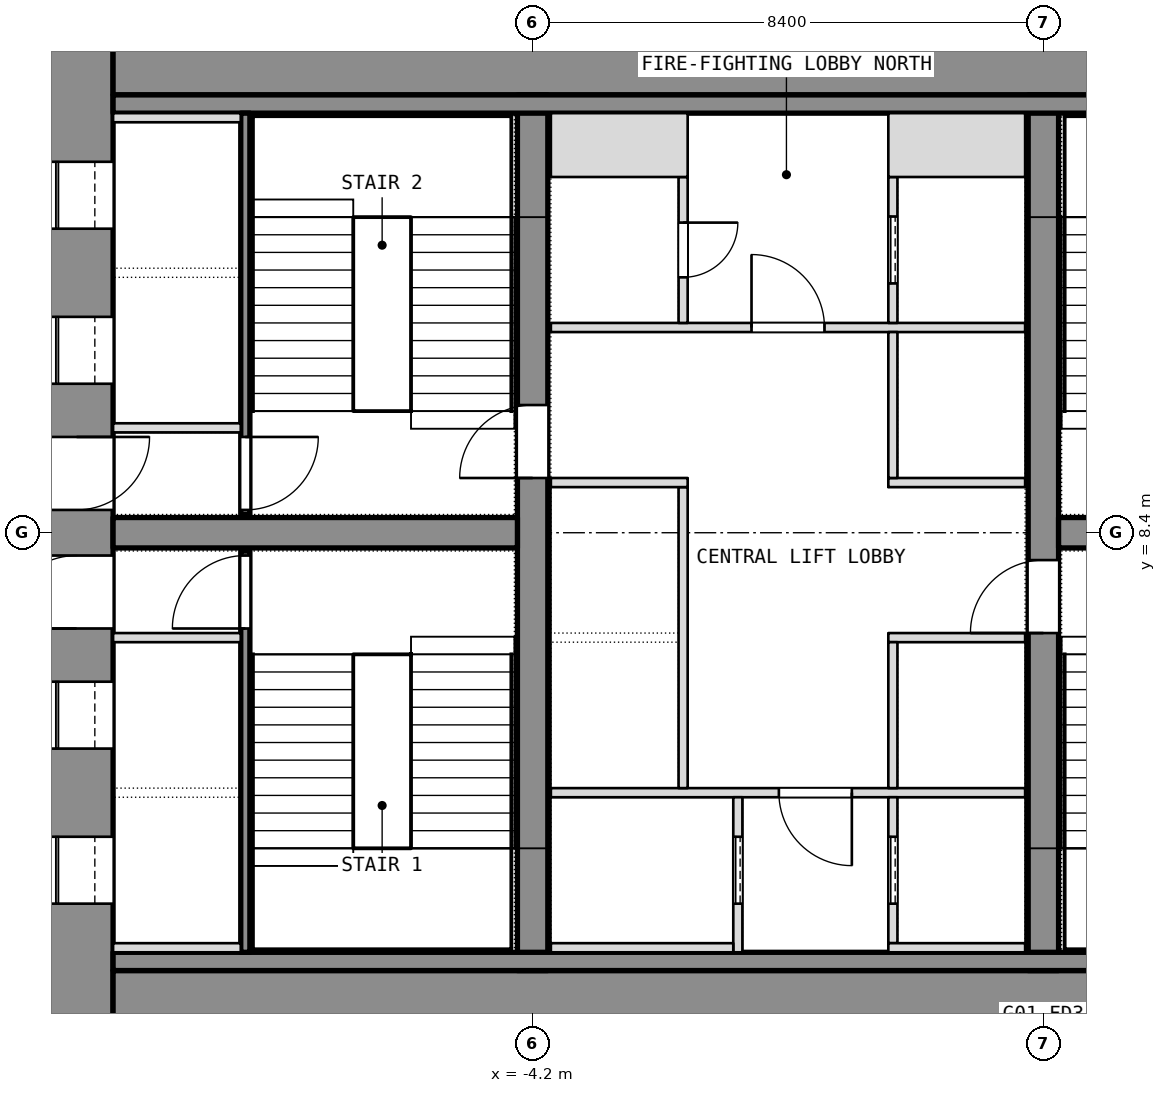
"""IFC4 building model, lengths in metres.
Left out: names, types, materials, properties, quantities, classifications, styles, units other than length and angle.
Written with IfcOpenShell. Run it as: python <this file> out.ifc"""

import sys

from ifc_helpers import new_model, si_unit, direction, frame, frame_2d, origin, place, context, subcontext, project, spatial, rectangle, extrude, element, fill, save


model = new_model("IFC4")
c1 = context("Model", 3, precision=1e-05, world=origin(), true_north=direction((0.0, 1.0)))
c2 = subcontext(c1, "Body", "Model", "MODEL_VIEW")
j1 = project(units=[si_unit("LENGTHUNIT", "METRE"), si_unit("PLANEANGLEUNIT", "RADIAN")], contexts=[c1])
p1 = place(None, origin())
s1 = spatial("IfcSite", under=j1, at=p1, CompositionType="ELEMENT")
p2 = place(p1, origin())
s2 = spatial("IfcBuilding", under=s1, at=p2, CompositionType="ELEMENT")
p3 = place(p2, frame((0.0, 0.0, 36.5)))
s3 = spatial("IfcBuildingStorey", under=s2, at=p3, CompositionType="ELEMENT", Elevation=36.5)
p4 = place(p3, frame((-11.7, 0.0, 0.0), z_axis=(0.0, 0.0, 1.0), x_axis=(0.0, 1.0, 0.0)))
e1 = element("IfcWall", 1, at=p4, inside=s3, PredefinedType="SHEAR", context=c2, shape_type="SweptSolid", body=[
    extrude(rectangle(XDim=16.8, YDim=1.2, at=frame_2d((8.4, 0.0))), origin(), (0.0, 0.0, 1.0), 3.6),
])
p5 = place(p4, frame((2.3, 0.0, 0.0)))
e2 = element("IfcOpeningElement", 2, at=p5, cuts=e1, PredefinedType="OPENING", context=c2, shape_type="SweptSolid", body=[
    extrude(rectangle(XDim=1.1, YDim=2.1, at=frame_2d((0.55, 1.05))), frame((0.0, 0.6, 0.0), z_axis=(0.0, -1.0, 0.0), x_axis=(1.0, 0.0, 0.0)), (0.0, 0.0, 1.0), 1.2),
])
p6 = place(p4, frame((4.85, 0.0, 0.0)))
e3 = element("IfcOpeningElement", 3, at=p6, cuts=e1, PredefinedType="OPENING", context=c2, shape_type="SweptSolid", body=[
    extrude(rectangle(XDim=1.1, YDim=2.1, at=frame_2d((0.55, 1.05))), frame((0.0, 0.6, 0.0), z_axis=(0.0, -1.0, 0.0), x_axis=(1.0, 0.0, 0.0)), (0.0, 0.0, 1.0), 1.2),
])
p7 = place(p4, frame((6.825, 0.0, 0.0)))
e4 = element("IfcOpeningElement", 4, at=p7, cuts=e1, PredefinedType="OPENING", context=c2, shape_type="SweptSolid", body=[
    extrude(rectangle(XDim=1.2, YDim=2.1, at=frame_2d((0.6, 1.05))), frame((0.0, 0.6, 0.0), z_axis=(0.0, -1.0, 0.0), x_axis=(1.0, 0.0, 0.0)), (0.0, 0.0, 1.0), 1.2),
])
p8 = place(p4, frame((13.4, 0.0, 0.0)))
e5 = element("IfcOpeningElement", 5, at=p8, cuts=e1, PredefinedType="OPENING", context=c2, shape_type="SweptSolid", body=[
    extrude(rectangle(XDim=1.1, YDim=2.1, at=frame_2d((0.55, 1.05))), frame((0.0, 0.6, 0.0), z_axis=(0.0, -1.0, 0.0), x_axis=(1.0, 0.0, 0.0)), (0.0, 0.0, 1.0), 1.2),
])
p9 = place(p4, frame((10.85, 0.0, 0.0)))
e6 = element("IfcOpeningElement", 6, at=p9, cuts=e1, PredefinedType="OPENING", context=c2, shape_type="SweptSolid", body=[
    extrude(rectangle(XDim=1.1, YDim=2.1, at=frame_2d((0.55, 1.05))), frame((0.0, 0.6, 0.0), z_axis=(0.0, -1.0, 0.0), x_axis=(1.0, 0.0, 0.0)), (0.0, 0.0, 1.0), 1.2),
])
p10 = place(p4, frame((8.775, 0.0, 0.0)))
e7 = element("IfcOpeningElement", 7, at=p10, cuts=e1, PredefinedType="OPENING", context=c2, shape_type="SweptSolid", body=[
    extrude(rectangle(XDim=1.2, YDim=2.1, at=frame_2d((0.6, 1.05))), frame((0.0, 0.6, 0.0), z_axis=(0.0, -1.0, 0.0), x_axis=(1.0, 0.0, 0.0)), (0.0, 0.0, 1.0), 1.2),
])
for number, where, z_axis, x_axis in (
    (8, (-11.1, 0.6, 0.0), (0.0, 0.0, 1.0), (1.0, 0.0, 0.0)),
    (9, (-11.1, 16.2, 0.0), (0.0, 0.0, 1.0), (1.0, 0.0, 0.0)),
):
    element("IfcWall", number, at=place(p3, frame(where, z_axis=z_axis, x_axis=x_axis)), inside=s3, PredefinedType="SHEAR", context=c2, shape_type="SweptSolid", body=[
        extrude(rectangle(XDim=22.2, YDim=1.2, at=frame_2d((11.1, 0.0))), origin(), (0.0, 0.0, 1.0), 3.6),
    ])
p11 = place(p3, frame((-4.2, 1.2, 0.0), z_axis=(0.0, 0.0, 1.0), x_axis=(0.0, 1.0, 0.0)))
e10 = element("IfcWall", 10, at=p11, inside=s3, PredefinedType="SHEAR", context=c2, shape_type="SweptSolid", body=[
    extrude(rectangle(XDim=14.4, YDim=0.5, at=frame_2d((7.2, 0.0))), origin(), (0.0, 0.0, 1.0), 3.6),
])
p12 = place(p11, frame((8.1, 0.0, 0.0)))
e11 = element("IfcOpeningElement", 11, at=p12, cuts=e10, PredefinedType="OPENING", context=c2, shape_type="SweptSolid", body=[
    extrude(rectangle(XDim=1.2, YDim=2.1, at=frame_2d((0.6, 1.05))), frame((0.0, 0.25, 0.0), z_axis=(0.0, -1.0, 0.0), x_axis=(1.0, 0.0, 0.0)), (0.0, 0.0, 1.0), 0.5),
])
p13 = place(p3, frame((4.2, 1.2, 0.0), z_axis=(0.0, 0.0, 1.0), x_axis=(0.0, 1.0, 0.0)))
e12 = element("IfcWall", 12, at=p13, inside=s3, PredefinedType="SHEAR", context=c2, shape_type="SweptSolid", body=[
    extrude(rectangle(XDim=14.4, YDim=0.5, at=frame_2d((7.2, 0.0))), origin(), (0.0, 0.0, 1.0), 3.6),
])
p14 = place(p13, frame((5.55, 0.0, 0.0)))
e13 = element("IfcOpeningElement", 13, at=p14, cuts=e12, PredefinedType="OPENING", context=c2, shape_type="SweptSolid", body=[
    extrude(rectangle(XDim=1.2, YDim=2.1, at=frame_2d((0.6, 1.05))), frame((0.0, 0.25, 0.0), z_axis=(0.0, -1.0, 0.0), x_axis=(1.0, 0.0, 0.0)), (0.0, 0.0, 1.0), 0.5),
])
for number, where, z_axis, x_axis in (
    (14, (-11.1, 8.4, 0.0), (0.0, 0.0, 1.0), (1.0, 0.0, 0.0)),
    (15, (4.45, 8.4, 0.0), (0.0, 0.0, 1.0), (1.0, 0.0, 0.0)),
):
    element("IfcWall", number, at=place(p3, frame(where, z_axis=z_axis, x_axis=x_axis)), inside=s3, PredefinedType="SHEAR", context=c2, shape_type="SweptSolid", body=[
        extrude(rectangle(XDim=6.65, YDim=0.5, at=frame_2d((3.325, 0.0))), origin(), (0.0, 0.0, 1.0), 3.6),
    ])
for number, where, z_axis, x_axis in (
    (16, (-11.1, 1.35, 0.0), (0.0, 0.0, 1.0), (1.0, 0.0, 0.0)),
    (17, (-11.1, 15.45, 0.0), (0.0, 0.0, 1.0), (1.0, 0.0, 0.0)),
):
    element("IfcWall", number, at=place(p3, frame(where, z_axis=z_axis, x_axis=x_axis)), inside=s3, PredefinedType="PARTITIONING", context=c2, shape_type="SweptSolid", body=[
        extrude(rectangle(XDim=22.2, YDim=0.3, at=frame_2d((11.1, 0.0))), origin(), (0.0, 0.0, 1.0), 3.34),
    ])
p15 = place(p3, frame((-8.925, 1.5, 0.0), z_axis=(0.0, 0.0, 1.0), x_axis=(0.0, 1.0, 0.0)))
e18 = element("IfcWall", 18, at=p15, inside=s3, PredefinedType="SHEAR", context=c2, shape_type="SweptSolid", body=[
    extrude(rectangle(XDim=6.6, YDim=0.15, at=frame_2d((3.3, 0.0))), origin(), (0.0, 0.0, 1.0), 3.34),
])
p16 = place(p15, frame((5.325, 0.0, 0.0)))
e19 = element("IfcOpeningElement", 19, at=p16, cuts=e18, PredefinedType="OPENING", context=c2, shape_type="SweptSolid", body=[
    extrude(rectangle(XDim=1.2, YDim=2.1, at=frame_2d((0.6, 1.05))), frame((0.0, 0.075, 0.0), z_axis=(0.0, -1.0, 0.0), x_axis=(1.0, 0.0, 0.0)), (0.0, 0.0, 1.0), 0.15),
])
for number, where, z_axis, x_axis in (
    (20, (-11.1, 6.675, 0.0), (0.0, 0.0, 1.0), (1.0, 0.0, 0.0)),
    (21, (-11.1, 1.575, 0.0), (0.0, 0.0, 1.0), (1.0, 0.0, 0.0)),
):
    element("IfcWall", number, at=place(p3, frame(where, z_axis=z_axis, x_axis=x_axis)), inside=s3, PredefinedType="SHEAR", context=c2, shape_type="SweptSolid", body=[
        extrude(rectangle(XDim=2.1, YDim=0.15, at=frame_2d((1.05, 0.0))), origin(), (0.0, 0.0, 1.0), 3.6),
    ])
p17 = place(p3, frame((-8.925, 8.7, 0.0), z_axis=(0.0, 0.0, 1.0), x_axis=(0.0, 1.0, 0.0)))
e22 = element("IfcWall", 22, at=p17, inside=s3, PredefinedType="SHEAR", context=c2, shape_type="SweptSolid", body=[
    extrude(rectangle(XDim=6.6, YDim=0.15, at=frame_2d((3.3, 0.0))), origin(), (0.0, 0.0, 1.0), 3.34),
])
p18 = place(p17, frame((0.075, 0.0, 0.0)))
e23 = element("IfcOpeningElement", 23, at=p18, cuts=e22, PredefinedType="OPENING", context=c2, shape_type="SweptSolid", body=[
    extrude(rectangle(XDim=1.2, YDim=2.1, at=frame_2d((0.6, 1.05))), frame((0.0, 0.075, 0.0), z_axis=(0.0, -1.0, 0.0), x_axis=(1.0, 0.0, 0.0)), (0.0, 0.0, 1.0), 0.15),
])
for number, where, z_axis, x_axis in (
    (24, (-11.1, 10.125, 0.0), (0.0, 0.0, 1.0), (1.0, 0.0, 0.0)),
    (25, (-11.1, 15.225, 0.0), (0.0, 0.0, 1.0), (1.0, 0.0, 0.0)),
):
    element("IfcWall", number, at=place(p3, frame(where, z_axis=z_axis, x_axis=x_axis)), inside=s3, PredefinedType="SHEAR", context=c2, shape_type="SweptSolid", body=[
        extrude(rectangle(XDim=2.1, YDim=0.15, at=frame_2d((1.05, 0.0))), origin(), (0.0, 0.0, 1.0), 3.6),
    ])
p19 = place(p3, frame((-3.9, 4.125, 0.0), z_axis=(0.0, 0.0, 1.0), x_axis=(1.0, 0.0, 0.0)))
e26 = element("IfcWall", 26, at=p19, inside=s3, PredefinedType="PARTITIONING", context=c2, shape_type="SweptSolid", body=[
    extrude(rectangle(XDim=7.8, YDim=0.15, at=frame_2d((3.9, 0.0))), origin(), (0.0, 0.0, 1.0), 3.34),
])
p20 = place(p19, frame((3.75, 0.0, 0.0)))
e27 = element("IfcOpeningElement", 27, at=p20, cuts=e26, PredefinedType="OPENING", context=c2, shape_type="SweptSolid", body=[
    extrude(rectangle(XDim=1.2, YDim=2.1, at=frame_2d((0.6, 1.05))), frame((0.0, 0.075, 0.0), z_axis=(0.0, -1.0, 0.0), x_axis=(1.0, 0.0, 0.0)), (0.0, 0.0, 1.0), 0.15),
])
p21 = place(p3, frame((-3.9, 11.775, 0.0), z_axis=(0.0, 0.0, 1.0), x_axis=(1.0, 0.0, 0.0)))
e28 = element("IfcWall", 28, at=p21, inside=s3, PredefinedType="PARTITIONING", context=c2, shape_type="SweptSolid", body=[
    extrude(rectangle(XDim=7.8, YDim=0.15, at=frame_2d((3.9, 0.0))), origin(), (0.0, 0.0, 1.0), 3.34),
])
p22 = place(p21, frame((3.3, 0.0, 0.0)))
e29 = element("IfcOpeningElement", 29, at=p22, cuts=e28, PredefinedType="OPENING", context=c2, shape_type="SweptSolid", body=[
    extrude(rectangle(XDim=1.2, YDim=2.1, at=frame_2d((0.6, 1.05))), frame((0.0, 0.075, 0.0), z_axis=(0.0, -1.0, 0.0), x_axis=(1.0, 0.0, 0.0)), (0.0, 0.0, 1.0), 0.15),
])
p23 = place(p3, frame((-0.825, 1.5, 0.0), z_axis=(0.0, 0.0, 1.0), x_axis=(0.0, 1.0, 0.0)))
e30 = element("IfcWall", 30, at=p23, inside=s3, PredefinedType="SHEAR", context=c2, shape_type="SweptSolid", body=[
    extrude(rectangle(XDim=2.55, YDim=0.15, at=frame_2d((1.275, 0.0))), origin(), (0.0, 0.0, 1.0), 3.6),
])
p24 = place(p23, frame((0.8, 0.0, 0.0)))
e31 = element("IfcOpeningElement", 31, at=p24, cuts=e30, PredefinedType="OPENING", context=c2, shape_type="SweptSolid", body=[
    extrude(rectangle(XDim=1.1, YDim=2.1, at=frame_2d((0.55, 1.05))), frame((0.0, 0.075, 0.0), z_axis=(0.0, -1.0, 0.0), x_axis=(1.0, 0.0, 0.0)), (0.0, 0.0, 1.0), 0.15),
])
p25 = place(p3, frame((-3.9, 1.575, 0.0), z_axis=(0.0, 0.0, 1.0), x_axis=(1.0, 0.0, 0.0)))
e32 = element("IfcWall", 32, at=p25, inside=s3, PredefinedType="SHEAR", context=c2, shape_type="SweptSolid", body=[
    extrude(rectangle(XDim=3.0, YDim=0.15, at=frame_2d((1.5, 0.0))), origin(), (0.0, 0.0, 1.0), 3.6),
])
p26 = place(p3, frame((-1.725, 4.2, 0.0), z_axis=(0.0, 0.0, 1.0), x_axis=(0.0, 1.0, 0.0)))
e33 = element("IfcWall", 33, at=p26, inside=s3, PredefinedType="SHEAR", context=c2, shape_type="SweptSolid", body=[
    extrude(rectangle(XDim=4.95, YDim=0.15, at=frame_2d((2.475, 0.0))), origin(), (0.0, 0.0, 1.0), 3.6),
])
p27 = place(p3, frame((-3.9, 9.225, 0.0), z_axis=(0.0, 0.0, 1.0), x_axis=(1.0, 0.0, 0.0)))
e34 = element("IfcWall", 34, at=p27, inside=s3, PredefinedType="SHEAR", context=c2, shape_type="SweptSolid", body=[
    extrude(rectangle(XDim=2.25, YDim=0.15, at=frame_2d((1.125, 0.0))), origin(), (0.0, 0.0, 1.0), 3.6),
])
p28 = place(p3, frame((-1.725, 11.85, 0.0), z_axis=(0.0, 0.0, 1.0), x_axis=(0.0, 1.0, 0.0)))
e35 = element("IfcWall", 35, at=p28, inside=s3, PredefinedType="PARTITIONING", context=c2, shape_type="SweptSolid", body=[
    extrude(rectangle(XDim=2.4, YDim=0.15, at=frame_2d((1.2, 0.0))), origin(), (0.0, 0.0, 1.0), 3.34),
])
p29 = place(p28, frame((0.75, 0.0, 0.0)))
e36 = element("IfcOpeningElement", 36, at=p29, cuts=e35, PredefinedType="OPENING", context=c2, shape_type="SweptSolid", body=[
    extrude(rectangle(XDim=0.9, YDim=2.1, at=frame_2d((0.45, 1.05))), frame((0.0, 0.075, 0.0), z_axis=(0.0, -1.0, 0.0), x_axis=(1.0, 0.0, 0.0)), (0.0, 0.0, 1.0), 0.15),
])
p30 = place(p3, frame((-3.9, 14.775, 0.0), z_axis=(0.0, 0.0, 1.0), x_axis=(1.0, 0.0, 0.0)))
e37 = element("IfcWall", 37, at=p30, inside=s3, PredefinedType="PARTITIONING", context=c2, shape_type="SweptSolid", body=[
    extrude(rectangle(XDim=2.25, YDim=1.05, at=frame_2d((1.125, 0.0))), origin(), (0.0, 0.0, 1.0), 3.34),
])
p31 = place(p3, frame((1.725, 1.65, 0.0), z_axis=(0.0, 0.0, 1.0), x_axis=(0.0, 1.0, 0.0)))
e38 = element("IfcWall", 38, at=p31, inside=s3, PredefinedType="SHEAR", context=c2, shape_type="SweptSolid", body=[
    extrude(rectangle(XDim=2.4, YDim=0.15, at=frame_2d((1.2, 0.0))), origin(), (0.0, 0.0, 1.0), 3.6),
])
p32 = place(p31, frame((0.65, 0.0, 0.0)))
e39 = element("IfcOpeningElement", 39, at=p32, cuts=e38, PredefinedType="OPENING", context=c2, shape_type="SweptSolid", body=[
    extrude(rectangle(XDim=1.1, YDim=2.1, at=frame_2d((0.55, 1.05))), frame((0.0, 0.075, 0.0), z_axis=(0.0, -1.0, 0.0), x_axis=(1.0, 0.0, 0.0)), (0.0, 0.0, 1.0), 0.15),
])
p33 = place(p3, frame((1.65, 1.575, 0.0), z_axis=(0.0, 0.0, 1.0), x_axis=(1.0, 0.0, 0.0)))
e40 = element("IfcWall", 40, at=p33, inside=s3, PredefinedType="SHEAR", context=c2, shape_type="SweptSolid", body=[
    extrude(rectangle(XDim=2.25, YDim=0.15, at=frame_2d((1.125, 0.0))), origin(), (0.0, 0.0, 1.0), 3.6),
])
p34 = place(p3, frame((1.725, 11.85, 0.0), z_axis=(0.0, 0.0, 1.0), x_axis=(0.0, 1.0, 0.0)))
e41 = element("IfcWall", 41, at=p34, inside=s3, PredefinedType="SHEAR", context=c2, shape_type="SweptSolid", body=[
    extrude(rectangle(XDim=2.4, YDim=0.15, at=frame_2d((1.2, 0.0))), origin(), (0.0, 0.0, 1.0), 3.6),
])
p35 = place(p34, frame((0.65, 0.0, 0.0)))
e42 = element("IfcOpeningElement", 42, at=p35, cuts=e41, PredefinedType="OPENING", context=c2, shape_type="SweptSolid", body=[
    extrude(rectangle(XDim=1.1, YDim=2.1, at=frame_2d((0.55, 1.05))), frame((0.0, 0.075, 0.0), z_axis=(0.0, -1.0, 0.0), x_axis=(1.0, 0.0, 0.0)), (0.0, 0.0, 1.0), 0.15),
])
p36 = place(p3, frame((1.65, 14.775, 0.0), z_axis=(0.0, 0.0, 1.0), x_axis=(1.0, 0.0, 0.0)))
e43 = element("IfcWall", 43, at=p36, inside=s3, PredefinedType="SHEAR", context=c2, shape_type="SweptSolid", body=[
    extrude(rectangle(XDim=2.25, YDim=1.05, at=frame_2d((1.125, 0.0))), origin(), (0.0, 0.0, 1.0), 3.6),
])
for number, where, z_axis, x_axis in (
    (44, (1.65, 6.675, 0.0), (0.0, 0.0, 1.0), (1.0, 0.0, 0.0)),
    (45, (1.65, 9.225, 0.0), (0.0, 0.0, 1.0), (1.0, 0.0, 0.0)),
):
    element("IfcWall", number, at=place(p3, frame(where, z_axis=z_axis, x_axis=x_axis)), inside=s3, PredefinedType="SHEAR", context=c2, shape_type="SweptSolid", body=[
        extrude(rectangle(XDim=2.25, YDim=0.15, at=frame_2d((1.125, 0.0))), origin(), (0.0, 0.0, 1.0), 3.6),
    ])
p37 = place(p3, frame((1.725, 4.2, 0.0), z_axis=(0.0, 0.0, 1.0), x_axis=(0.0, 1.0, 0.0)))
e46 = element("IfcWall", 46, at=p37, inside=s3, PredefinedType="SHEAR", context=c2, shape_type="SweptSolid", body=[
    extrude(rectangle(XDim=2.4, YDim=0.15, at=frame_2d((1.2, 0.0))), origin(), (0.0, 0.0, 1.0), 3.6),
])
p38 = place(p3, frame((1.725, 9.3, 0.0), z_axis=(0.0, 0.0, 1.0), x_axis=(0.0, 1.0, 0.0)))
e47 = element("IfcWall", 47, at=p38, inside=s3, PredefinedType="SHEAR", context=c2, shape_type="SweptSolid", body=[
    extrude(rectangle(XDim=2.4, YDim=0.15, at=frame_2d((1.2, 0.0))), origin(), (0.0, 0.0, 1.0), 3.6),
])
p39 = place(p5, origin())
e48 = element("IfcDoor", 48, at=p39, inside=s3, OperationType="SLIDING_TO_LEFT", PredefinedType="DOOR", context=c2, shape_type="SweptSolid", body=[
    extrude(rectangle(XDim=1.1, YDim=2.1, at=frame_2d((0.55, 1.05))), frame((0.0, 0.025, 0.0), z_axis=(0.0, -1.0, 0.0), x_axis=(1.0, 0.0, 0.0)), (0.0, 0.0, 1.0), 0.05),
])
fill(e2, e48)
p40 = place(p6, origin())
e49 = element("IfcDoor", 49, at=p40, inside=s3, OperationType="SLIDING_TO_LEFT", PredefinedType="DOOR", context=c2, shape_type="SweptSolid", body=[
    extrude(rectangle(XDim=1.1, YDim=2.1, at=frame_2d((0.55, 1.05))), frame((0.0, 0.025, 0.0), z_axis=(0.0, -1.0, 0.0), x_axis=(1.0, 0.0, 0.0)), (0.0, 0.0, 1.0), 0.05),
])
fill(e3, e49)
p41 = place(p7, origin())
e50 = element("IfcDoor", 50, at=p41, inside=s3, OperationType="SINGLE_SWING_LEFT", PredefinedType="DOOR", context=c2, shape_type="SweptSolid", body=[
    extrude(rectangle(XDim=1.2, YDim=2.1, at=frame_2d((0.6, 1.05))), frame((0.0, 0.025, 0.0), z_axis=(0.0, -1.0, 0.0), x_axis=(1.0, 0.0, 0.0)), (0.0, 0.0, 1.0), 0.05),
])
fill(e4, e50)
p42 = place(p16, origin())
e51 = element("IfcDoor", 51, at=p42, inside=s3, OperationType="SINGLE_SWING_LEFT", PredefinedType="DOOR", context=c2, shape_type="SweptSolid", body=[
    extrude(rectangle(XDim=1.2, YDim=2.1, at=frame_2d((0.6, 1.05))), frame((0.0, 0.025, 0.0), z_axis=(0.0, -1.0, 0.0), x_axis=(1.0, 0.0, 0.0)), (0.0, 0.0, 1.0), 0.05),
])
fill(e19, e51)
p43 = place(p8, origin())
e52 = element("IfcDoor", 52, at=p43, inside=s3, OperationType="SLIDING_TO_LEFT", PredefinedType="DOOR", context=c2, shape_type="SweptSolid", body=[
    extrude(rectangle(XDim=1.1, YDim=2.1, at=frame_2d((0.55, 1.05))), frame((0.0, 0.025, 0.0), z_axis=(0.0, -1.0, 0.0), x_axis=(1.0, 0.0, 0.0)), (0.0, 0.0, 1.0), 0.05),
])
fill(e5, e52)
p44 = place(p9, origin())
e53 = element("IfcDoor", 53, at=p44, inside=s3, OperationType="SLIDING_TO_LEFT", PredefinedType="DOOR", context=c2, shape_type="SweptSolid", body=[
    extrude(rectangle(XDim=1.1, YDim=2.1, at=frame_2d((0.55, 1.05))), frame((0.0, 0.025, 0.0), z_axis=(0.0, -1.0, 0.0), x_axis=(1.0, 0.0, 0.0)), (0.0, 0.0, 1.0), 0.05),
])
fill(e6, e53)
p45 = place(p10, origin())
e54 = element("IfcDoor", 54, at=p45, inside=s3, OperationType="SINGLE_SWING_LEFT", PredefinedType="DOOR", context=c2, shape_type="SweptSolid", body=[
    extrude(rectangle(XDim=1.2, YDim=2.1, at=frame_2d((0.6, 1.05))), frame((0.0, 0.025, 0.0), z_axis=(0.0, -1.0, 0.0), x_axis=(1.0, 0.0, 0.0)), (0.0, 0.0, 1.0), 0.05),
])
fill(e7, e54)
p46 = place(p18, origin())
e55 = element("IfcDoor", 55, at=p46, inside=s3, OperationType="SINGLE_SWING_LEFT", PredefinedType="DOOR", context=c2, shape_type="SweptSolid", body=[
    extrude(rectangle(XDim=1.2, YDim=2.1, at=frame_2d((0.6, 1.05))), frame((0.0, 0.025, 0.0), z_axis=(0.0, -1.0, 0.0), x_axis=(1.0, 0.0, 0.0)), (0.0, 0.0, 1.0), 0.05),
])
fill(e23, e55)
p47 = place(p24, origin())
e56 = element("IfcDoor", 56, at=p47, inside=s3, OperationType="SLIDING_TO_LEFT", PredefinedType="DOOR", context=c2, shape_type="SweptSolid", body=[
    extrude(rectangle(XDim=1.1, YDim=2.1, at=frame_2d((0.55, 1.05))), frame((0.0, 0.025, 0.0), z_axis=(0.0, -1.0, 0.0), x_axis=(1.0, 0.0, 0.0)), (0.0, 0.0, 1.0), 0.05),
])
fill(e31, e56)
p48 = place(p32, origin())
e57 = element("IfcDoor", 57, at=p48, inside=s3, OperationType="SLIDING_TO_LEFT", PredefinedType="DOOR", context=c2, shape_type="SweptSolid", body=[
    extrude(rectangle(XDim=1.1, YDim=2.1, at=frame_2d((0.55, 1.05))), frame((0.0, 0.025, 0.0), z_axis=(0.0, -1.0, 0.0), x_axis=(1.0, 0.0, 0.0)), (0.0, 0.0, 1.0), 0.05),
])
fill(e39, e57)
p49 = place(p35, origin())
e58 = element("IfcDoor", 58, at=p49, inside=s3, OperationType="SLIDING_TO_LEFT", PredefinedType="DOOR", context=c2, shape_type="SweptSolid", body=[
    extrude(rectangle(XDim=1.1, YDim=2.1, at=frame_2d((0.55, 1.05))), frame((0.0, 0.025, 0.0), z_axis=(0.0, -1.0, 0.0), x_axis=(1.0, 0.0, 0.0)), (0.0, 0.0, 1.0), 0.05),
])
fill(e42, e58)
p50 = place(p20, origin())
e59 = element("IfcDoor", 59, at=p50, inside=s3, OperationType="SINGLE_SWING_LEFT", PredefinedType="DOOR", context=c2, shape_type="SweptSolid", body=[
    extrude(rectangle(XDim=1.2, YDim=2.1, at=frame_2d((0.6, 1.05))), frame((0.0, 0.025, 0.0), z_axis=(0.0, -1.0, 0.0), x_axis=(1.0, 0.0, 0.0)), (0.0, 0.0, 1.0), 0.05),
])
fill(e27, e59)
p51 = place(p22, origin())
e60 = element("IfcDoor", 60, at=p51, inside=s3, OperationType="SINGLE_SWING_LEFT", PredefinedType="DOOR", context=c2, shape_type="SweptSolid", body=[
    extrude(rectangle(XDim=1.2, YDim=2.1, at=frame_2d((0.6, 1.05))), frame((0.0, 0.025, 0.0), z_axis=(0.0, -1.0, 0.0), x_axis=(1.0, 0.0, 0.0)), (0.0, 0.0, 1.0), 0.05),
])
fill(e29, e60)
p52 = place(p29, origin())
e61 = element("IfcDoor", 61, at=p52, inside=s3, OperationType="SINGLE_SWING_LEFT", PredefinedType="DOOR", context=c2, shape_type="SweptSolid", body=[
    extrude(rectangle(XDim=0.9, YDim=2.1, at=frame_2d((0.45, 1.05))), frame((0.0, 0.025, 0.0), z_axis=(0.0, -1.0, 0.0), x_axis=(1.0, 0.0, 0.0)), (0.0, 0.0, 1.0), 0.05),
])
fill(e36, e61)
p53 = place(p12, origin())
e62 = element("IfcDoor", 62, at=p53, inside=s3, OperationType="SINGLE_SWING_LEFT", PredefinedType="DOOR", context=c2, shape_type="SweptSolid", body=[
    extrude(rectangle(XDim=1.2, YDim=2.1, at=frame_2d((0.6, 1.05))), frame((0.0, 0.025, 0.0), z_axis=(0.0, -1.0, 0.0), x_axis=(1.0, 0.0, 0.0)), (0.0, 0.0, 1.0), 0.05),
])
fill(e11, e62)
p54 = place(p14, origin())
e63 = element("IfcDoor", 63, at=p54, inside=s3, OperationType="SINGLE_SWING_LEFT", PredefinedType="DOOR", context=c2, shape_type="SweptSolid", body=[
    extrude(rectangle(XDim=1.2, YDim=2.1, at=frame_2d((0.6, 1.05))), frame((0.0, 0.025, 0.0), z_axis=(0.0, -1.0, 0.0), x_axis=(1.0, 0.0, 0.0)), (0.0, 0.0, 1.0), 0.05),
])
fill(e13, e63)
save(model, sys.argv[1])
